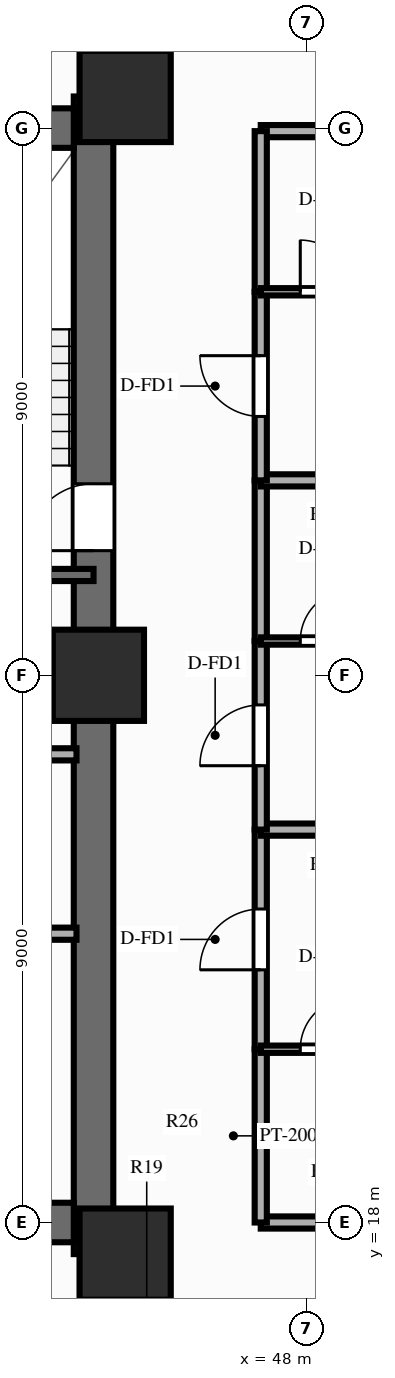
"""IFC4 building model, lengths in metres.
Left out: names, types, materials, properties, quantities, classifications, styles, units other than length and angle.
Written with IfcOpenShell. Run it as: python <this file> out.ifc"""

import sys

from ifc_helpers import new_model, si_unit, direction, frame, frame_2d, origin, origin_2d, place, context, subcontext, project, spatial, rectangle, extrude, source, transform, mapped, element, fill, save


model = new_model("IFC4")
c1 = context("Model", 3, precision=1e-05, world=origin(), true_north=direction((0.0, 1.0)))
c2 = subcontext(c1, "Body", "Model", "MODEL_VIEW")
j1 = project(units=[si_unit("LENGTHUNIT", "METRE"), si_unit("PLANEANGLEUNIT", "RADIAN")], contexts=[c1])
p1 = place(None, origin())
s1 = spatial("IfcSite", under=j1, at=p1, CompositionType="ELEMENT")
p2 = place(p1, origin())
s2 = spatial("IfcBuilding", under=s1, at=p2, CompositionType="ELEMENT")
p3 = place(p2, frame((0.0, 0.0, 61.4)))
s3 = spatial("IfcBuildingStorey", under=s2, at=p3, CompositionType="ELEMENT", Elevation=61.4)
p4 = place(p3, frame((44.5, 17.48, 0.0), z_axis=(0.0, 0.0, 1.0), x_axis=(0.0, 1.0, 0.0)))
e1 = element("IfcWall", 1, at=p4, inside=s3, PredefinedType="SHEAR", context=c2, shape_type="SweptSolid", body=[
    extrude(rectangle(XDim=19.04, YDim=0.65, at=frame_2d((9.52, 0.0))), origin(), (0.0, 0.0, 1.0), 3.0),
])
p5 = place(p4, frame((12.67, 0.0, 0.0), z_axis=(0.0, 0.0, 1.0), x_axis=(-1.0, 0.0, 0.0)))
e2 = element("IfcOpeningElement", 2, at=p5, cuts=e1, PredefinedType="OPENING", context=c2, shape_type="SweptSolid", body=[
    extrude(rectangle(XDim=1.1, YDim=2.15, at=frame_2d((0.55, 1.075))), frame((0.0, 0.337, 0.0), z_axis=(0.0, -1.0, 0.0), x_axis=(1.0, 0.0, 0.0)), (0.0, 0.0, 1.0), 0.674),
])
p6 = place(p3, frame((31.825, 18.0, 0.0), z_axis=(0.0, 0.0, 1.0), x_axis=(1.0, 0.0, 0.0)))
e3 = element("IfcWall", 3, at=p6, inside=s3, PredefinedType="SHEAR", context=c2, shape_type="SweptSolid", body=[
    extrude(rectangle(XDim=12.35, YDim=0.65, at=frame_2d((6.175, 0.0))), origin(), (0.0, 0.0, 1.0), 3.0),
])
p7 = place(p3, frame((31.825, 36.0, 0.0), z_axis=(0.0, 0.0, 1.0), x_axis=(1.0, 0.0, 0.0)))
e4 = element("IfcWall", 4, at=p7, inside=s3, PredefinedType="SHEAR", context=c2, shape_type="SweptSolid", body=[
    extrude(rectangle(XDim=12.35, YDim=0.65, at=frame_2d((6.175, 0.0))), origin(), (0.0, 0.0, 1.0), 3.0),
])
p8 = place(p7, frame((5.125, 0.0, 0.0), z_axis=(0.0, 0.0, 1.0), x_axis=(-1.0, 0.0, 0.0)))
e5 = element("IfcOpeningElement", 5, at=p8, cuts=e4, PredefinedType="OPENING", context=c2, shape_type="SweptSolid", body=[
    extrude(rectangle(XDim=1.4, YDim=2.15, at=frame_2d((0.7, 1.075))), frame((0.0, 0.337, 0.0), z_axis=(0.0, -1.0, 0.0), x_axis=(1.0, 0.0, 0.0)), (0.0, 0.0, 1.0), 0.674),
])
m1 = source(origin(), c2, "Body", "SweptSolid", [
    extrude(rectangle(XDim=1.5, YDim=1.5, at=origin_2d()), origin(), (0.0, 0.0, 1.0), 3.0),
])
for number, where, z_axis, x_axis in (
    (6, (45.02, 17.48, 0.0), (0.0, 0.0, 1.0), (1.0, 0.0, 0.0)),
    (7, (45.02, 36.52, 0.0), (0.0, 0.0, 1.0), (1.0, 0.0, 0.0)),
    (8, (44.58, 27.0, 0.0), (0.0, 0.0, 1.0), (1.0, 0.0, 0.0)),
):
    element("IfcColumn", number, at=place(p3, frame(where, z_axis=z_axis, x_axis=x_axis)), inside=s3, PredefinedType="COLUMN", context=c2, shape_type="MappedRepresentation", body=[
        mapped(m1, transform((0.0, 0.0, 0.0), scale=1.0)),
    ])
p9 = place(p3, frame((41.55, 22.75, 0.0), z_axis=(0.0, 0.0, 1.0), x_axis=(1.0, 0.0, 0.0)))
e9 = element("IfcWall", 9, at=p9, inside=s3, PredefinedType="PARTITIONING", context=c2, shape_type="SweptSolid", body=[
    extrude(rectangle(XDim=2.67, YDim=0.2, at=frame_2d((1.335, 0.0))), origin(), (0.0, 0.0, 1.0), 2.79),
])
p10 = place(p3, frame((41.55, 25.7, 0.0), z_axis=(0.0, 0.0, 1.0), x_axis=(1.0, 0.0, 0.0)))
e10 = element("IfcWall", 10, at=p10, inside=s3, PredefinedType="PARTITIONING", context=c2, shape_type="SweptSolid", body=[
    extrude(rectangle(XDim=2.67, YDim=0.2, at=frame_2d((1.335, 0.0))), origin(), (0.0, 0.0, 1.0), 2.14),
])
p11 = place(p3, frame((40.57, 28.65, 0.0), z_axis=(0.0, 0.0, 1.0), x_axis=(1.0, 0.0, 0.0)))
e11 = element("IfcWall", 11, at=p11, inside=s3, PredefinedType="SOLIDWALL", context=c2, shape_type="SweptSolid", body=[
    extrude(rectangle(XDim=3.93, YDim=0.2, at=frame_2d((1.965, 0.0))), origin(), (0.0, 0.0, 1.0), 2.79),
])
for number, where, z_axis, x_axis in (
    (12, (47.25, 18.0, 0.0), (0.0, 0.0, 1.0), (1.0, 0.0, 0.0)),
    (13, (47.25, 35.95, 0.0), (0.0, 0.0, 1.0), (1.0, 0.0, 0.0)),
):
    element("IfcWall", number, at=place(p3, frame(where, z_axis=z_axis, x_axis=x_axis)), inside=s3, PredefinedType="PARTITIONING", context=c2, shape_type="SweptSolid", body=[
        extrude(rectangle(XDim=16.6, YDim=0.2, at=frame_2d((8.3, 0.0))), origin(), (0.0, 0.0, 1.0), 2.24),
    ])
p12 = place(p3, frame((47.25, 18.0, 0.0), z_axis=(0.0, 0.0, 1.0), x_axis=(0.0, 1.0, 0.0)))
e14 = element("IfcWall", 14, at=p12, inside=s3, PredefinedType="PARTITIONING", context=c2, shape_type="SweptSolid", body=[
    extrude(rectangle(XDim=2.85, YDim=0.2, at=frame_2d((1.425, 0.0))), origin(), (0.0, 0.0, 1.0), 2.79),
])
p13 = place(p3, frame((47.25, 20.85, 0.0), z_axis=(0.0, 0.0, 1.0), x_axis=(0.0, 1.0, 0.0)))
e15 = element("IfcWall", 15, at=p13, inside=s3, PredefinedType="PARTITIONING", context=c2, shape_type="SweptSolid", body=[
    extrude(rectangle(XDim=3.612, YDim=0.2, at=frame_2d((1.806, 0.0))), origin(), (0.0, 0.0, 1.0), 2.79),
])
p14 = place(p13, frame((1.306, 0.0, 0.0)))
e16 = element("IfcOpeningElement", 16, at=p14, cuts=e15, PredefinedType="OPENING", context=c2, shape_type="SweptSolid", body=[
    extrude(rectangle(XDim=1.0, YDim=2.15, at=frame_2d((0.5, 1.075))), frame((0.0, 0.112, 0.0), z_axis=(0.0, -1.0, 0.0), x_axis=(1.0, 0.0, 0.0)), (0.0, 0.0, 1.0), 0.224),
])
p15 = place(p3, frame((47.25, 20.85, 0.0), z_axis=(0.0, 0.0, 1.0), x_axis=(1.0, 0.0, 0.0)))
e17 = element("IfcWall", 17, at=p15, inside=s3, PredefinedType="PARTITIONING", context=c2, shape_type="SweptSolid", body=[
    extrude(rectangle(XDim=2.15, YDim=0.12, at=frame_2d((1.075, 0.0))), origin(), (0.0, 0.0, 1.0), 2.79),
])
p16 = place(p15, frame((0.65, 0.0, 0.0)))
e18 = element("IfcOpeningElement", 18, at=p16, cuts=e17, PredefinedType="OPENING", context=c2, shape_type="SweptSolid", body=[
    extrude(rectangle(XDim=0.85, YDim=2.05, at=frame_2d((0.425, 1.025))), frame((0.0, 0.072, 0.0), z_axis=(0.0, -1.0, 0.0), x_axis=(1.0, 0.0, 0.0)), (0.0, 0.0, 1.0), 0.144),
])
p17 = place(p3, frame((47.25, 24.462, 0.0), z_axis=(0.0, 0.0, 1.0), x_axis=(1.0, 0.0, 0.0)))
e19 = element("IfcWall", 19, at=p17, inside=s3, PredefinedType="PARTITIONING", context=c2, shape_type="SweptSolid", body=[
    extrude(rectangle(XDim=16.6, YDim=0.2, at=frame_2d((8.3, 0.0))), origin(), (0.0, 0.0, 1.0), 2.79),
])
p18 = place(p3, frame((47.25, 24.462, 0.0), z_axis=(0.0, 0.0, 1.0), x_axis=(0.0, 1.0, 0.0)))
e20 = element("IfcWall", 20, at=p18, inside=s3, PredefinedType="PARTITIONING", context=c2, shape_type="SweptSolid", body=[
    extrude(rectangle(XDim=3.102, YDim=0.2, at=frame_2d((1.551, 0.0))), origin(), (0.0, 0.0, 1.0), 2.79),
])
p19 = place(p18, frame((1.051, 0.0, 0.0)))
e21 = element("IfcOpeningElement", 21, at=p19, cuts=e20, PredefinedType="OPENING", context=c2, shape_type="SweptSolid", body=[
    extrude(rectangle(XDim=1.0, YDim=2.15, at=frame_2d((0.5, 1.075))), frame((0.0, 0.112, 0.0), z_axis=(0.0, -1.0, 0.0), x_axis=(1.0, 0.0, 0.0)), (0.0, 0.0, 1.0), 0.224),
])
p20 = place(p3, frame((47.25, 27.564, 0.0), z_axis=(0.0, 0.0, 1.0), x_axis=(0.0, 1.0, 0.0)))
e22 = element("IfcWall", 22, at=p20, inside=s3, PredefinedType="PARTITIONING", context=c2, shape_type="SweptSolid", body=[
    extrude(rectangle(XDim=2.642, YDim=0.2, at=frame_2d((1.321, 0.0))), origin(), (0.0, 0.0, 1.0), 2.79),
])
p21 = place(p3, frame((47.25, 27.564, 0.0), z_axis=(0.0, 0.0, 1.0), x_axis=(1.0, 0.0, 0.0)))
e23 = element("IfcWall", 23, at=p21, inside=s3, PredefinedType="PARTITIONING", context=c2, shape_type="SweptSolid", body=[
    extrude(rectangle(XDim=2.15, YDim=0.12, at=frame_2d((1.075, 0.0))), origin(), (0.0, 0.0, 1.0), 2.79),
])
p22 = place(p21, frame((0.65, 0.0, 0.0)))
e24 = element("IfcOpeningElement", 24, at=p22, cuts=e23, PredefinedType="OPENING", context=c2, shape_type="SweptSolid", body=[
    extrude(rectangle(XDim=0.85, YDim=2.05, at=frame_2d((0.425, 1.025))), frame((0.0, 0.072, 0.0), z_axis=(0.0, -1.0, 0.0), x_axis=(1.0, 0.0, 0.0)), (0.0, 0.0, 1.0), 0.144),
])
p23 = place(p3, frame((47.25, 30.206, 0.0), z_axis=(0.0, 0.0, 1.0), x_axis=(1.0, 0.0, 0.0)))
e25 = element("IfcWall", 25, at=p23, inside=s3, PredefinedType="PARTITIONING", context=c2, shape_type="SweptSolid", body=[
    extrude(rectangle(XDim=16.6, YDim=0.2, at=frame_2d((8.3, 0.0))), origin(), (0.0, 0.0, 1.0), 2.79),
])
p24 = place(p3, frame((47.25, 30.206, 0.0), z_axis=(0.0, 0.0, 1.0), x_axis=(0.0, 1.0, 0.0)))
e26 = element("IfcWall", 26, at=p24, inside=s3, PredefinedType="PARTITIONING", context=c2, shape_type="SweptSolid", body=[
    extrude(rectangle(XDim=3.102, YDim=0.2, at=frame_2d((1.551, 0.0))), origin(), (0.0, 0.0, 1.0), 2.79),
])
p25 = place(p24, frame((1.051, 0.0, 0.0)))
e27 = element("IfcOpeningElement", 27, at=p25, cuts=e26, PredefinedType="OPENING", context=c2, shape_type="SweptSolid", body=[
    extrude(rectangle(XDim=1.0, YDim=2.15, at=frame_2d((0.5, 1.075))), frame((0.0, 0.112, 0.0), z_axis=(0.0, -1.0, 0.0), x_axis=(1.0, 0.0, 0.0)), (0.0, 0.0, 1.0), 0.224),
])
p26 = place(p3, frame((47.25, 33.308, 0.0), z_axis=(0.0, 0.0, 1.0), x_axis=(0.0, 1.0, 0.0)))
e28 = element("IfcWall", 28, at=p26, inside=s3, PredefinedType="PARTITIONING", context=c2, shape_type="SweptSolid", body=[
    extrude(rectangle(XDim=2.642, YDim=0.2, at=frame_2d((1.321, 0.0))), origin(), (0.0, 0.0, 1.0), 2.79),
])
p27 = place(p3, frame((47.25, 33.308, 0.0), z_axis=(0.0, 0.0, 1.0), x_axis=(1.0, 0.0, 0.0)))
e29 = element("IfcWall", 29, at=p27, inside=s3, PredefinedType="PARTITIONING", context=c2, shape_type="SweptSolid", body=[
    extrude(rectangle(XDim=2.15, YDim=0.12, at=frame_2d((1.075, 0.0))), origin(), (0.0, 0.0, 1.0), 2.79),
])
p28 = place(p27, frame((0.65, 0.0, 0.0)))
e30 = element("IfcOpeningElement", 30, at=p28, cuts=e29, PredefinedType="OPENING", context=c2, shape_type="SweptSolid", body=[
    extrude(rectangle(XDim=0.85, YDim=2.05, at=frame_2d((0.425, 1.025))), frame((0.0, 0.072, 0.0), z_axis=(0.0, -1.0, 0.0), x_axis=(1.0, 0.0, 0.0)), (0.0, 0.0, 1.0), 0.144),
])
m2 = source(origin(), c2, "Body", "SweptSolid", [
    extrude(rectangle(XDim=1.1, YDim=2.15, at=frame_2d((0.55, 1.075))), frame((0.0, 0.025, 0.0), z_axis=(0.0, -1.0, 0.0), x_axis=(1.0, 0.0, 0.0)), (0.0, 0.0, 1.0), 0.05),
])
p29 = place(p5, origin())
e31 = element("IfcDoor", 31, at=p29, inside=s3, OperationType="SINGLE_SWING_RIGHT", PredefinedType="DOOR", context=c2, shape_type="MappedRepresentation", body=[
    mapped(m2, transform((0.0, 0.0, 0.0), scale=1.0)),
])
fill(e2, e31)
m3 = source(origin(), c2, "Body", "SweptSolid", [
    extrude(rectangle(XDim=1.0, YDim=2.15, at=frame_2d((0.5, 1.075))), frame((0.0, 0.025, 0.0), z_axis=(0.0, -1.0, 0.0), x_axis=(1.0, 0.0, 0.0)), (0.0, 0.0, 1.0), 0.05),
])
p30 = place(p14, origin())
e32 = element("IfcDoor", 32, at=p30, inside=s3, OperationType="SINGLE_SWING_LEFT", PredefinedType="DOOR", context=c2, shape_type="MappedRepresentation", body=[
    mapped(m3, transform((0.0, 0.0, 0.0), scale=1.0)),
])
fill(e16, e32)
m4 = source(origin(), c2, "Body", "SweptSolid", [
    extrude(rectangle(XDim=0.85, YDim=2.05, at=frame_2d((0.425, 1.025))), frame((0.0, 0.025, 0.0), z_axis=(0.0, -1.0, 0.0), x_axis=(1.0, 0.0, 0.0)), (0.0, 0.0, 1.0), 0.05),
])
p31 = place(p16, origin())
e33 = element("IfcDoor", 33, at=p31, inside=s3, OperationType="SINGLE_SWING_RIGHT", PredefinedType="DOOR", context=c2, shape_type="MappedRepresentation", body=[
    mapped(m4, transform((0.0, 0.0, 0.0), scale=1.0)),
])
fill(e18, e33)
p32 = place(p19, origin())
e34 = element("IfcDoor", 34, at=p32, inside=s3, OperationType="SINGLE_SWING_LEFT", PredefinedType="DOOR", context=c2, shape_type="MappedRepresentation", body=[
    mapped(m3, transform((0.0, 0.0, 0.0), scale=1.0)),
])
fill(e21, e34)
p33 = place(p22, origin())
e35 = element("IfcDoor", 35, at=p33, inside=s3, OperationType="SINGLE_SWING_RIGHT", PredefinedType="DOOR", context=c2, shape_type="MappedRepresentation", body=[
    mapped(m4, transform((0.0, 0.0, 0.0), scale=1.0)),
])
fill(e24, e35)
p34 = place(p25, origin())
e36 = element("IfcDoor", 36, at=p34, inside=s3, OperationType="SINGLE_SWING_RIGHT", PredefinedType="DOOR", context=c2, shape_type="MappedRepresentation", body=[
    mapped(m3, transform((0.0, 0.0, 0.0), scale=1.0)),
])
fill(e27, e36)
p35 = place(p28, origin())
e37 = element("IfcDoor", 37, at=p35, inside=s3, OperationType="SINGLE_SWING_LEFT", PredefinedType="DOOR", context=c2, shape_type="MappedRepresentation", body=[
    mapped(m4, transform((0.0, 0.0, 0.0), scale=1.0)),
])
fill(e30, e37)
save(model, sys.argv[1])
